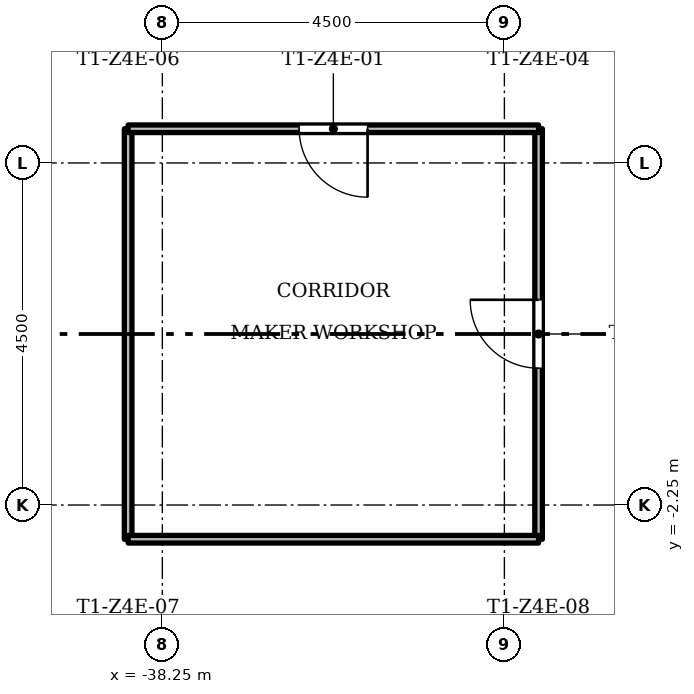
"""IFC4 building model, lengths in metres.
Left out: names, types, materials, properties, quantities, classifications, styles, units other than length and angle.
Written with IfcOpenShell. Run it as: python <this file> out.ifc"""

import sys

from ifc_helpers import new_model, si_unit, direction, frame, frame_2d, origin, place, context, subcontext, project, spatial, rectangle, extrude, element, fill, save


model = new_model("IFC4")
c1 = context("Model", 3, precision=1e-05, world=origin(), true_north=direction((0.0, 1.0)))
c2 = subcontext(c1, "Body", "Model", "MODEL_VIEW")
j1 = project(units=[si_unit("LENGTHUNIT", "METRE"), si_unit("PLANEANGLEUNIT", "RADIAN")], contexts=[c1])
p1 = place(None, origin())
s1 = spatial("IfcSite", under=j1, at=p1, CompositionType="ELEMENT")
p2 = place(p1, origin())
s2 = spatial("IfcBuilding", under=s1, at=p2, CompositionType="ELEMENT")
p3 = place(p2, frame((0.0, 0.0, 206.2)))
s3 = spatial("IfcBuildingStorey", under=s2, at=p3, CompositionType="ELEMENT", Elevation=206.2)
p4 = place(p3, frame((-38.7, -2.7, 0.0), z_axis=(0.0, 0.0, 1.0), x_axis=(0.0, 1.0, 0.0)))
e1 = element("IfcWall", 1, at=p4, inside=s3, PredefinedType="PARTITIONING", context=c2, shape_type="SweptSolid", body=[
    extrude(rectangle(XDim=5.4, YDim=0.1, at=frame_2d((2.7, 0.0))), origin(), (0.0, 0.0, 1.0), 3.0),
])
p5 = place(p3, frame((-33.3, -2.7, 0.0), z_axis=(0.0, 0.0, 1.0), x_axis=(0.0, 1.0, 0.0)))
e2 = element("IfcWall", 2, at=p5, inside=s3, PredefinedType="PARTITIONING", context=c2, shape_type="SweptSolid", body=[
    extrude(rectangle(XDim=5.4, YDim=0.1, at=frame_2d((2.7, 0.0))), origin(), (0.0, 0.0, 1.0), 3.0),
])
p6 = place(p5, frame((2.25, 0.0, 0.0)))
e3 = element("IfcOpeningElement", 3, at=p6, cuts=e2, PredefinedType="OPENING", context=c2, shape_type="SweptSolid", body=[
    extrude(rectangle(XDim=0.9, YDim=2.1, at=frame_2d((0.45, 1.05))), frame((0.0, 0.06, 0.0), z_axis=(0.0, -1.0, 0.0), x_axis=(1.0, 0.0, 0.0)), (0.0, 0.0, 1.0), 0.12),
])
p7 = place(p3, frame((-38.7, -2.7, 0.0), z_axis=(0.0, 0.0, 1.0), x_axis=(1.0, 0.0, 0.0)))
e4 = element("IfcWall", 4, at=p7, inside=s3, PredefinedType="PARTITIONING", context=c2, shape_type="SweptSolid", body=[
    extrude(rectangle(XDim=5.4, YDim=0.1, at=frame_2d((2.7, 0.0))), origin(), (0.0, 0.0, 1.0), 3.0),
])
p8 = place(p3, frame((-38.7, 2.7, 0.0), z_axis=(0.0, 0.0, 1.0), x_axis=(1.0, 0.0, 0.0)))
e5 = element("IfcWall", 5, at=p8, inside=s3, PredefinedType="PARTITIONING", context=c2, shape_type="SweptSolid", body=[
    extrude(rectangle(XDim=5.4, YDim=0.1, at=frame_2d((2.7, 0.0))), origin(), (0.0, 0.0, 1.0), 3.0),
])
p9 = place(p8, frame((2.25, 0.0, 0.0)))
e6 = element("IfcOpeningElement", 6, at=p9, cuts=e5, PredefinedType="OPENING", context=c2, shape_type="SweptSolid", body=[
    extrude(rectangle(XDim=0.9, YDim=2.1, at=frame_2d((0.45, 1.05))), frame((0.0, 0.06, 0.0), z_axis=(0.0, -1.0, 0.0), x_axis=(1.0, 0.0, 0.0)), (0.0, 0.0, 1.0), 0.12),
])
p10 = place(p9, origin())
e7 = element("IfcDoor", 7, at=p10, inside=s3, OperationType="SINGLE_SWING_RIGHT", PredefinedType="DOOR", context=c2, shape_type="SweptSolid", body=[
    extrude(rectangle(XDim=0.9, YDim=2.1, at=frame_2d((0.45, 1.05))), frame((0.0, 0.025, 0.0), z_axis=(0.0, -1.0, 0.0), x_axis=(1.0, 0.0, 0.0)), (0.0, 0.0, 1.0), 0.05),
])
fill(e6, e7)
p11 = place(p6, origin())
e8 = element("IfcDoor", 8, at=p11, inside=s3, OperationType="SINGLE_SWING_LEFT", PredefinedType="DOOR", context=c2, shape_type="SweptSolid", body=[
    extrude(rectangle(XDim=0.9, YDim=2.1, at=frame_2d((0.45, 1.05))), frame((0.0, 0.025, 0.0), z_axis=(0.0, -1.0, 0.0), x_axis=(1.0, 0.0, 0.0)), (0.0, 0.0, 1.0), 0.05),
])
fill(e3, e8)
save(model, sys.argv[1])
